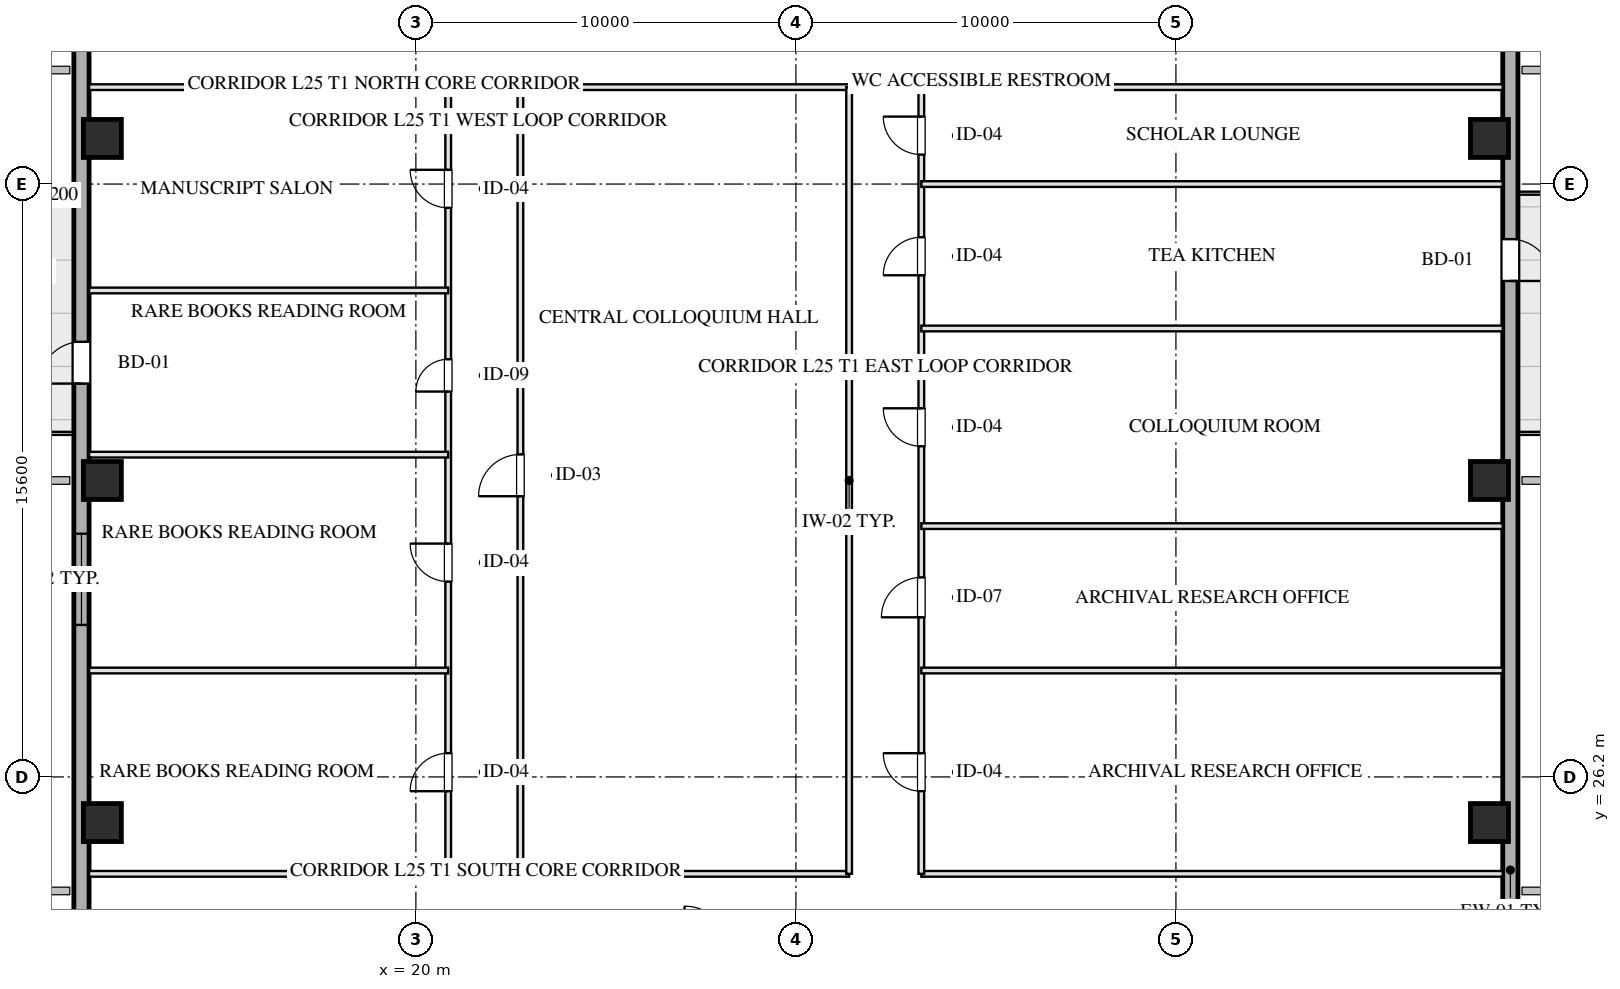
"""IFC4 building model, lengths in metres.
Left out: names, types, materials, properties, quantities, classifications, styles, units other than length and angle.
Written with IfcOpenShell. Run it as: python <this file> out.ifc"""

import sys

from ifc_helpers import new_model, si_unit, direction, frame, frame_2d, origin, origin_2d, place, context, subcontext, project, spatial, rectangle, hollow_rectangle, extrude, element, fill, save


model = new_model("IFC4")
c1 = context("Model", 3, precision=1e-05, world=origin(), true_north=direction((0.0, 1.0)))
c2 = subcontext(c1, "Body", "Model", "MODEL_VIEW")
j1 = project(units=[si_unit("LENGTHUNIT", "METRE"), si_unit("PLANEANGLEUNIT", "RADIAN")], contexts=[c1])
p1 = place(None, origin())
s1 = spatial("IfcSite", under=j1, at=p1, CompositionType="ELEMENT")
p2 = place(p1, origin())
s2 = spatial("IfcBuilding", under=s1, at=p2, CompositionType="ELEMENT")
p3 = place(p2, frame((0.0, 0.0, 100.05)))
s3 = spatial("IfcBuildingStorey", under=s2, at=p3, CompositionType="ELEMENT", Elevation=100.05)
for number, where, z_axis, x_axis in (
    (1, (11.75, 25.0, 0.0), (0.0, 0.0, 1.0), (1.0, 0.0, 0.0)),
    (2, (11.75, 34.0, 0.0), (0.0, 0.0, 1.0), (1.0, 0.0, 0.0)),
    (3, (11.75, 43.0, 0.0), (0.0, 0.0, 1.0), (1.0, 0.0, 0.0)),
    (4, (48.25, 25.0, 0.0), (0.0, 0.0, 1.0), (1.0, 0.0, 0.0)),
    (5, (48.25, 34.0, 0.0), (0.0, 0.0, 1.0), (1.0, 0.0, 0.0)),
    (6, (48.25, 43.0, 0.0), (0.0, 0.0, 1.0), (1.0, 0.0, 0.0)),
):
    element("IfcColumn", number, at=place(p3, frame(where, z_axis=z_axis, x_axis=x_axis)), inside=s3, PredefinedType="COLUMN", context=c2, shape_type="SweptSolid", body=[
        extrude(hollow_rectangle(XDim=1.0, YDim=1.0, WallThickness=0.036, at=origin_2d()), origin(), (0.0, 0.0, 1.0), 3.451),
    ])
p4 = place(p3, frame((11.2, 9.0, 0.0), z_axis=(0.0, 0.0, 1.0), x_axis=(0.0, 1.0, 0.0)))
e7 = element("IfcWall", 7, at=p4, inside=s3, PredefinedType="SOLIDWALL", context=c2, shape_type="SweptSolid", body=[
    extrude(rectangle(XDim=50.0, YDim=0.4, at=frame_2d((25.0, 0.0))), origin(), (0.0, 0.0, 1.0), 2.55),
])
p5 = place(p4, frame((21.2, 0.0, 0.75)))
e8 = element("IfcOpeningElement", 8, at=p5, cuts=e7, PredefinedType="OPENING", context=c2, shape_type="SweptSolid", body=[
    extrude(rectangle(XDim=2.4, YDim=1.4, at=frame_2d((1.2, 0.7))), frame((0.0, 0.21, 0.0), z_axis=(0.0, -1.0, 0.0), x_axis=(1.0, 0.0, 0.0)), (0.0, 0.0, 1.0), 0.42),
])
p6 = place(p4, frame((27.55, 0.0, 0.0)))
e9 = element("IfcOpeningElement", 9, at=p6, cuts=e7, PredefinedType="OPENING", context=c2, shape_type="SweptSolid", body=[
    extrude(rectangle(XDim=1.1, YDim=2.15, at=frame_2d((0.55, 1.075))), frame((0.0, 0.21, 0.0), z_axis=(0.0, -1.0, 0.0), x_axis=(1.0, 0.0, 0.0)), (0.0, 0.0, 1.0), 0.42),
])
p7 = place(p3, frame((48.8, 59.0, 0.0), z_axis=(0.0, 0.0, 1.0), x_axis=(0.0, -1.0, 0.0)))
e10 = element("IfcWall", 10, at=p7, inside=s3, PredefinedType="SOLIDWALL", context=c2, shape_type="SweptSolid", body=[
    extrude(rectangle(XDim=50.0, YDim=0.4, at=frame_2d((25.0, 0.0))), origin(), (0.0, 0.0, 1.0), 2.55),
])
p8 = place(p7, frame((18.65, 0.0, 0.0)))
e11 = element("IfcOpeningElement", 11, at=p8, cuts=e10, PredefinedType="OPENING", context=c2, shape_type="SweptSolid", body=[
    extrude(rectangle(XDim=1.1, YDim=2.15, at=frame_2d((0.55, 1.075))), frame((0.0, 0.21, 0.0), z_axis=(0.0, -1.0, 0.0), x_axis=(1.0, 0.0, 0.0)), (0.0, 0.0, 1.0), 0.42),
])
p9 = place(p3, frame((11.4, 23.65, 0.0), z_axis=(0.0, 0.0, 1.0), x_axis=(1.0, 0.0, 0.0)))
e12 = element("IfcWall", 12, at=p9, inside=s3, PredefinedType="PARTITIONING", context=c2, shape_type="SweptSolid", body=[
    extrude(rectangle(XDim=9.45, YDim=0.15, at=frame_2d((4.725, 0.0))), origin(), (0.0, 0.0, 1.0), 3.155),
])
p10 = place(p3, frame((22.75, 23.65, 0.0), z_axis=(0.0, 0.0, 1.0), x_axis=(1.0, 0.0, 0.0)))
e13 = element("IfcWall", 13, at=p10, inside=s3, PredefinedType="PARTITIONING", context=c2, shape_type="SweptSolid", body=[
    extrude(rectangle(XDim=8.65, YDim=0.15, at=frame_2d((4.325, 0.0))), origin(), (0.0, 0.0, 1.0), 3.155),
])
p11 = place(p3, frame((33.3, 23.65, 0.0), z_axis=(0.0, 0.0, 1.0), x_axis=(1.0, 0.0, 0.0)))
e14 = element("IfcWall", 14, at=p11, inside=s3, PredefinedType="PARTITIONING", context=c2, shape_type="SweptSolid", body=[
    extrude(rectangle(XDim=15.3, YDim=0.15, at=frame_2d((7.65, 0.0))), origin(), (0.0, 0.0, 1.0), 3.155),
])
p12 = place(p3, frame((11.4, 44.35, 0.0), z_axis=(0.0, 0.0, 1.0), x_axis=(1.0, 0.0, 0.0)))
e15 = element("IfcWall", 15, at=p12, inside=s3, PredefinedType="PARTITIONING", context=c2, shape_type="SweptSolid", body=[
    extrude(rectangle(XDim=9.45, YDim=0.15, at=frame_2d((4.725, 0.0))), origin(), (0.0, 0.0, 1.0), 3.155),
])
p13 = place(p3, frame((22.75, 44.35, 0.0), z_axis=(0.0, 0.0, 1.0), x_axis=(1.0, 0.0, 0.0)))
e16 = element("IfcWall", 16, at=p13, inside=s3, PredefinedType="PARTITIONING", context=c2, shape_type="SweptSolid", body=[
    extrude(rectangle(XDim=8.65, YDim=0.15, at=frame_2d((4.325, 0.0))), origin(), (0.0, 0.0, 1.0), 3.155),
])
p14 = place(p3, frame((33.3, 44.35, 0.0), z_axis=(0.0, 0.0, 1.0), x_axis=(1.0, 0.0, 0.0)))
e17 = element("IfcWall", 17, at=p14, inside=s3, PredefinedType="PARTITIONING", context=c2, shape_type="SweptSolid", body=[
    extrude(rectangle(XDim=15.3, YDim=0.15, at=frame_2d((7.65, 0.0))), origin(), (0.0, 0.0, 1.0), 3.155),
])
p15 = place(p3, frame((20.85, 23.65, 0.0), z_axis=(0.0, 0.0, 1.0), x_axis=(0.0, 1.0, 0.0)))
e18 = element("IfcWall", 18, at=p15, inside=s3, PredefinedType="PARTITIONING", context=c2, shape_type="SweptSolid", body=[
    extrude(rectangle(XDim=20.7, YDim=0.15, at=frame_2d((10.35, 0.0))), origin(), (0.0, 0.0, 1.0), 3.155),
])
p16 = place(p15, frame((2.175, 0.0, 0.0)))
e19 = element("IfcOpeningElement", 19, at=p16, cuts=e18, PredefinedType="OPENING", context=c2, shape_type="SweptSolid", body=[
    extrude(rectangle(XDim=1.0, YDim=2.05, at=frame_2d((0.5, 1.025))), frame((0.0, 0.085, 0.0), z_axis=(0.0, -1.0, 0.0), x_axis=(1.0, 0.0, 0.0)), (0.0, 0.0, 1.0), 0.17),
])
p17 = place(p15, frame((7.69, 0.0, 0.0)))
e20 = element("IfcOpeningElement", 20, at=p17, cuts=e18, PredefinedType="OPENING", context=c2, shape_type="SweptSolid", body=[
    extrude(rectangle(XDim=1.0, YDim=2.05, at=frame_2d((0.5, 1.025))), frame((0.0, 0.085, 0.0), z_axis=(0.0, -1.0, 0.0), x_axis=(1.0, 0.0, 0.0)), (0.0, 0.0, 1.0), 0.17),
])
p18 = place(p15, frame((12.69, 0.0, 0.0)))
e21 = element("IfcOpeningElement", 21, at=p18, cuts=e18, PredefinedType="OPENING", context=c2, shape_type="SweptSolid", body=[
    extrude(rectangle(XDim=0.85, YDim=2.05, at=frame_2d((0.425, 1.025))), frame((0.0, 0.085, 0.0), z_axis=(0.0, -1.0, 0.0), x_axis=(1.0, 0.0, 0.0)), (0.0, 0.0, 1.0), 0.17),
])
p19 = place(p15, frame((17.525, 0.0, 0.0)))
e22 = element("IfcOpeningElement", 22, at=p19, cuts=e18, PredefinedType="OPENING", context=c2, shape_type="SweptSolid", body=[
    extrude(rectangle(XDim=1.0, YDim=2.05, at=frame_2d((0.5, 1.025))), frame((0.0, 0.085, 0.0), z_axis=(0.0, -1.0, 0.0), x_axis=(1.0, 0.0, 0.0)), (0.0, 0.0, 1.0), 0.17),
])
p20 = place(p3, frame((22.75, 23.65, 0.0), z_axis=(0.0, 0.0, 1.0), x_axis=(0.0, 1.0, 0.0)))
e23 = element("IfcWall", 23, at=p20, inside=s3, PredefinedType="PARTITIONING", context=c2, shape_type="SweptSolid", body=[
    extrude(rectangle(XDim=20.7, YDim=0.15, at=frame_2d((10.35, 0.0))), origin(), (0.0, 0.0, 1.0), 3.155),
])
p21 = place(p20, frame((9.936, 0.0, 0.0)))
e24 = element("IfcOpeningElement", 24, at=p21, cuts=e23, PredefinedType="OPENING", context=c2, shape_type="SweptSolid", body=[
    extrude(rectangle(XDim=1.1, YDim=2.05, at=frame_2d((0.55, 1.025))), frame((0.0, 0.085, 0.0), z_axis=(0.0, -1.0, 0.0), x_axis=(1.0, 0.0, 0.0)), (0.0, 0.0, 1.0), 0.17),
])
p22 = place(p3, frame((31.4, 23.65, 0.0), z_axis=(0.0, 0.0, 1.0), x_axis=(0.0, 1.0, 0.0)))
e25 = element("IfcWall", 25, at=p22, inside=s3, PredefinedType="PARTITIONING", context=c2, shape_type="SweptSolid", body=[
    extrude(rectangle(XDim=20.7, YDim=0.15, at=frame_2d((10.35, 0.0))), origin(), (0.0, 0.0, 1.0), 3.155),
])
p23 = place(p3, frame((33.3, 23.65, 0.0), z_axis=(0.0, 0.0, 1.0), x_axis=(0.0, 1.0, 0.0)))
e26 = element("IfcWall", 26, at=p23, inside=s3, PredefinedType="PARTITIONING", context=c2, shape_type="SweptSolid", body=[
    extrude(rectangle(XDim=20.7, YDim=0.15, at=frame_2d((10.35, 0.0))), origin(), (0.0, 0.0, 1.0), 3.155),
])
p24 = place(p23, frame((2.175, 0.0, 0.0)))
e27 = element("IfcOpeningElement", 27, at=p24, cuts=e26, PredefinedType="OPENING", context=c2, shape_type="SweptSolid", body=[
    extrude(rectangle(XDim=1.0, YDim=2.05, at=frame_2d((0.5, 1.025))), frame((0.0, 0.085, 0.0), z_axis=(0.0, -1.0, 0.0), x_axis=(1.0, 0.0, 0.0)), (0.0, 0.0, 1.0), 0.17),
])
p25 = place(p23, frame((6.75, 0.0, 0.0)))
e28 = element("IfcOpeningElement", 28, at=p25, cuts=e26, PredefinedType="OPENING", context=c2, shape_type="SweptSolid", body=[
    extrude(rectangle(XDim=1.05, YDim=2.05, at=frame_2d((0.525, 1.025))), frame((0.0, 0.085, 0.0), z_axis=(0.0, -1.0, 0.0), x_axis=(1.0, 0.0, 0.0)), (0.0, 0.0, 1.0), 0.17),
])
p26 = place(p23, frame((11.25, 0.0, 0.0)))
e29 = element("IfcOpeningElement", 29, at=p26, cuts=e26, PredefinedType="OPENING", context=c2, shape_type="SweptSolid", body=[
    extrude(rectangle(XDim=1.0, YDim=2.05, at=frame_2d((0.5, 1.025))), frame((0.0, 0.085, 0.0), z_axis=(0.0, -1.0, 0.0), x_axis=(1.0, 0.0, 0.0)), (0.0, 0.0, 1.0), 0.17),
])
p27 = place(p23, frame((15.75, 0.0, 0.0)))
e30 = element("IfcOpeningElement", 30, at=p27, cuts=e26, PredefinedType="OPENING", context=c2, shape_type="SweptSolid", body=[
    extrude(rectangle(XDim=1.0, YDim=2.05, at=frame_2d((0.5, 1.025))), frame((0.0, 0.085, 0.0), z_axis=(0.0, -1.0, 0.0), x_axis=(1.0, 0.0, 0.0)), (0.0, 0.0, 1.0), 0.17),
])
p28 = place(p23, frame((18.925, 0.0, 0.0)))
e31 = element("IfcOpeningElement", 31, at=p28, cuts=e26, PredefinedType="OPENING", context=c2, shape_type="SweptSolid", body=[
    extrude(rectangle(XDim=1.0, YDim=2.05, at=frame_2d((0.5, 1.025))), frame((0.0, 0.085, 0.0), z_axis=(0.0, -1.0, 0.0), x_axis=(1.0, 0.0, 0.0)), (0.0, 0.0, 1.0), 0.17),
])
for number, where, z_axis, x_axis in (
    (32, (11.4, 29.0, 0.0), (0.0, 0.0, 1.0), (1.0, 0.0, 0.0)),
    (33, (11.4, 34.68, 0.0), (0.0, 0.0, 1.0), (1.0, 0.0, 0.0)),
    (34, (11.4, 39.0, 0.0), (0.0, 0.0, 1.0), (1.0, 0.0, 0.0)),
):
    element("IfcWall", number, at=place(p3, frame(where, z_axis=z_axis, x_axis=x_axis)), inside=s3, PredefinedType="PARTITIONING", context=c2, shape_type="SweptSolid", body=[
        extrude(rectangle(XDim=9.45, YDim=0.15, at=frame_2d((4.725, 0.0))), origin(), (0.0, 0.0, 1.0), 3.155),
    ])
for number, where, z_axis, x_axis in (
    (35, (33.3, 29.0, 0.0), (0.0, 0.0, 1.0), (1.0, 0.0, 0.0)),
    (36, (33.3, 32.8, 0.0), (0.0, 0.0, 1.0), (1.0, 0.0, 0.0)),
    (37, (33.3, 38.0, 0.0), (0.0, 0.0, 1.0), (1.0, 0.0, 0.0)),
    (38, (33.3, 41.8, 0.0), (0.0, 0.0, 1.0), (1.0, 0.0, 0.0)),
):
    element("IfcWall", number, at=place(p3, frame(where, z_axis=z_axis, x_axis=x_axis)), inside=s3, PredefinedType="PARTITIONING", context=c2, shape_type="SweptSolid", body=[
        extrude(rectangle(XDim=15.3, YDim=0.15, at=frame_2d((7.65, 0.0))), origin(), (0.0, 0.0, 1.0), 3.155),
    ])
p29 = place(p5, origin())
e39 = element("IfcWindow", 39, at=p29, inside=s3, PartitioningType="TRIPLE_PANEL_VERTICAL", PredefinedType="WINDOW", context=c2, shape_type="SweptSolid", body=[
    extrude(rectangle(XDim=2.4, YDim=1.4, at=frame_2d((1.2, 0.7))), frame((0.0, 0.03, 0.0), z_axis=(0.0, -1.0, 0.0), x_axis=(1.0, 0.0, 0.0)), (0.0, 0.0, 1.0), 0.06),
])
fill(e8, e39)
p30 = place(p6, origin())
e40 = element("IfcDoor", 40, at=p30, inside=s3, OperationType="SINGLE_SWING_LEFT", PredefinedType="DOOR", context=c2, shape_type="SweptSolid", body=[
    extrude(rectangle(XDim=1.1, YDim=2.15, at=frame_2d((0.55, 1.075))), frame((0.0, 0.025, 0.0), z_axis=(0.0, -1.0, 0.0), x_axis=(1.0, 0.0, 0.0)), (0.0, 0.0, 1.0), 0.05),
])
fill(e9, e40)
p31 = place(p8, origin())
e41 = element("IfcDoor", 41, at=p31, inside=s3, OperationType="SINGLE_SWING_RIGHT", PredefinedType="DOOR", context=c2, shape_type="SweptSolid", body=[
    extrude(rectangle(XDim=1.1, YDim=2.15, at=frame_2d((0.55, 1.075))), frame((0.0, 0.025, 0.0), z_axis=(0.0, -1.0, 0.0), x_axis=(1.0, 0.0, 0.0)), (0.0, 0.0, 1.0), 0.05),
])
fill(e11, e41)
p32 = place(p16, origin())
e42 = element("IfcDoor", 42, at=p32, inside=s3, OperationType="SINGLE_SWING_LEFT", PredefinedType="DOOR", context=c2, shape_type="SweptSolid", body=[
    extrude(rectangle(XDim=1.0, YDim=2.05, at=frame_2d((0.5, 1.025))), frame((0.0, 0.025, 0.0), z_axis=(0.0, -1.0, 0.0), x_axis=(1.0, 0.0, 0.0)), (0.0, 0.0, 1.0), 0.05),
])
fill(e19, e42)
p33 = place(p17, origin())
e43 = element("IfcDoor", 43, at=p33, inside=s3, OperationType="SINGLE_SWING_RIGHT", PredefinedType="DOOR", context=c2, shape_type="SweptSolid", body=[
    extrude(rectangle(XDim=1.0, YDim=2.05, at=frame_2d((0.5, 1.025))), frame((0.0, 0.025, 0.0), z_axis=(0.0, -1.0, 0.0), x_axis=(1.0, 0.0, 0.0)), (0.0, 0.0, 1.0), 0.05),
])
fill(e20, e43)
p34 = place(p18, origin())
e44 = element("IfcDoor", 44, at=p34, inside=s3, OperationType="SINGLE_SWING_LEFT", PredefinedType="DOOR", context=c2, shape_type="SweptSolid", body=[
    extrude(rectangle(XDim=0.85, YDim=2.05, at=frame_2d((0.425, 1.025))), frame((0.0, 0.025, 0.0), z_axis=(0.0, -1.0, 0.0), x_axis=(1.0, 0.0, 0.0)), (0.0, 0.0, 1.0), 0.05),
])
fill(e21, e44)
p35 = place(p19, origin())
e45 = element("IfcDoor", 45, at=p35, inside=s3, OperationType="SINGLE_SWING_RIGHT", PredefinedType="DOOR", context=c2, shape_type="SweptSolid", body=[
    extrude(rectangle(XDim=1.0, YDim=2.05, at=frame_2d((0.5, 1.025))), frame((0.0, 0.025, 0.0), z_axis=(0.0, -1.0, 0.0), x_axis=(1.0, 0.0, 0.0)), (0.0, 0.0, 1.0), 0.05),
])
fill(e22, e45)
p36 = place(p21, origin())
e46 = element("IfcDoor", 46, at=p36, inside=s3, OperationType="SINGLE_SWING_LEFT", PredefinedType="DOOR", context=c2, shape_type="SweptSolid", body=[
    extrude(rectangle(XDim=1.1, YDim=2.05, at=frame_2d((0.55, 1.025))), frame((0.0, 0.025, 0.0), z_axis=(0.0, -1.0, 0.0), x_axis=(1.0, 0.0, 0.0)), (0.0, 0.0, 1.0), 0.05),
])
fill(e24, e46)
p37 = place(p24, origin())
e47 = element("IfcDoor", 47, at=p37, inside=s3, OperationType="SINGLE_SWING_RIGHT", PredefinedType="DOOR", context=c2, shape_type="SweptSolid", body=[
    extrude(rectangle(XDim=1.0, YDim=2.05, at=frame_2d((0.5, 1.025))), frame((0.0, 0.025, 0.0), z_axis=(0.0, -1.0, 0.0), x_axis=(1.0, 0.0, 0.0)), (0.0, 0.0, 1.0), 0.05),
])
fill(e27, e47)
p38 = place(p25, origin())
e48 = element("IfcDoor", 48, at=p38, inside=s3, OperationType="SINGLE_SWING_LEFT", PredefinedType="DOOR", context=c2, shape_type="SweptSolid", body=[
    extrude(rectangle(XDim=1.05, YDim=2.05, at=frame_2d((0.525, 1.025))), frame((0.0, 0.025, 0.0), z_axis=(0.0, -1.0, 0.0), x_axis=(1.0, 0.0, 0.0)), (0.0, 0.0, 1.0), 0.05),
])
fill(e28, e48)
p39 = place(p26, origin())
e49 = element("IfcDoor", 49, at=p39, inside=s3, OperationType="SINGLE_SWING_RIGHT", PredefinedType="DOOR", context=c2, shape_type="SweptSolid", body=[
    extrude(rectangle(XDim=1.0, YDim=2.05, at=frame_2d((0.5, 1.025))), frame((0.0, 0.025, 0.0), z_axis=(0.0, -1.0, 0.0), x_axis=(1.0, 0.0, 0.0)), (0.0, 0.0, 1.0), 0.05),
])
fill(e29, e49)
p40 = place(p27, origin())
e50 = element("IfcDoor", 50, at=p40, inside=s3, OperationType="SINGLE_SWING_LEFT", PredefinedType="DOOR", context=c2, shape_type="SweptSolid", body=[
    extrude(rectangle(XDim=1.0, YDim=2.05, at=frame_2d((0.5, 1.025))), frame((0.0, 0.025, 0.0), z_axis=(0.0, -1.0, 0.0), x_axis=(1.0, 0.0, 0.0)), (0.0, 0.0, 1.0), 0.05),
])
fill(e30, e50)
p41 = place(p28, origin())
e51 = element("IfcDoor", 51, at=p41, inside=s3, OperationType="SINGLE_SWING_RIGHT", PredefinedType="DOOR", context=c2, shape_type="SweptSolid", body=[
    extrude(rectangle(XDim=1.0, YDim=2.05, at=frame_2d((0.5, 1.025))), frame((0.0, 0.025, 0.0), z_axis=(0.0, -1.0, 0.0), x_axis=(1.0, 0.0, 0.0)), (0.0, 0.0, 1.0), 0.05),
])
fill(e31, e51)
save(model, sys.argv[1])
